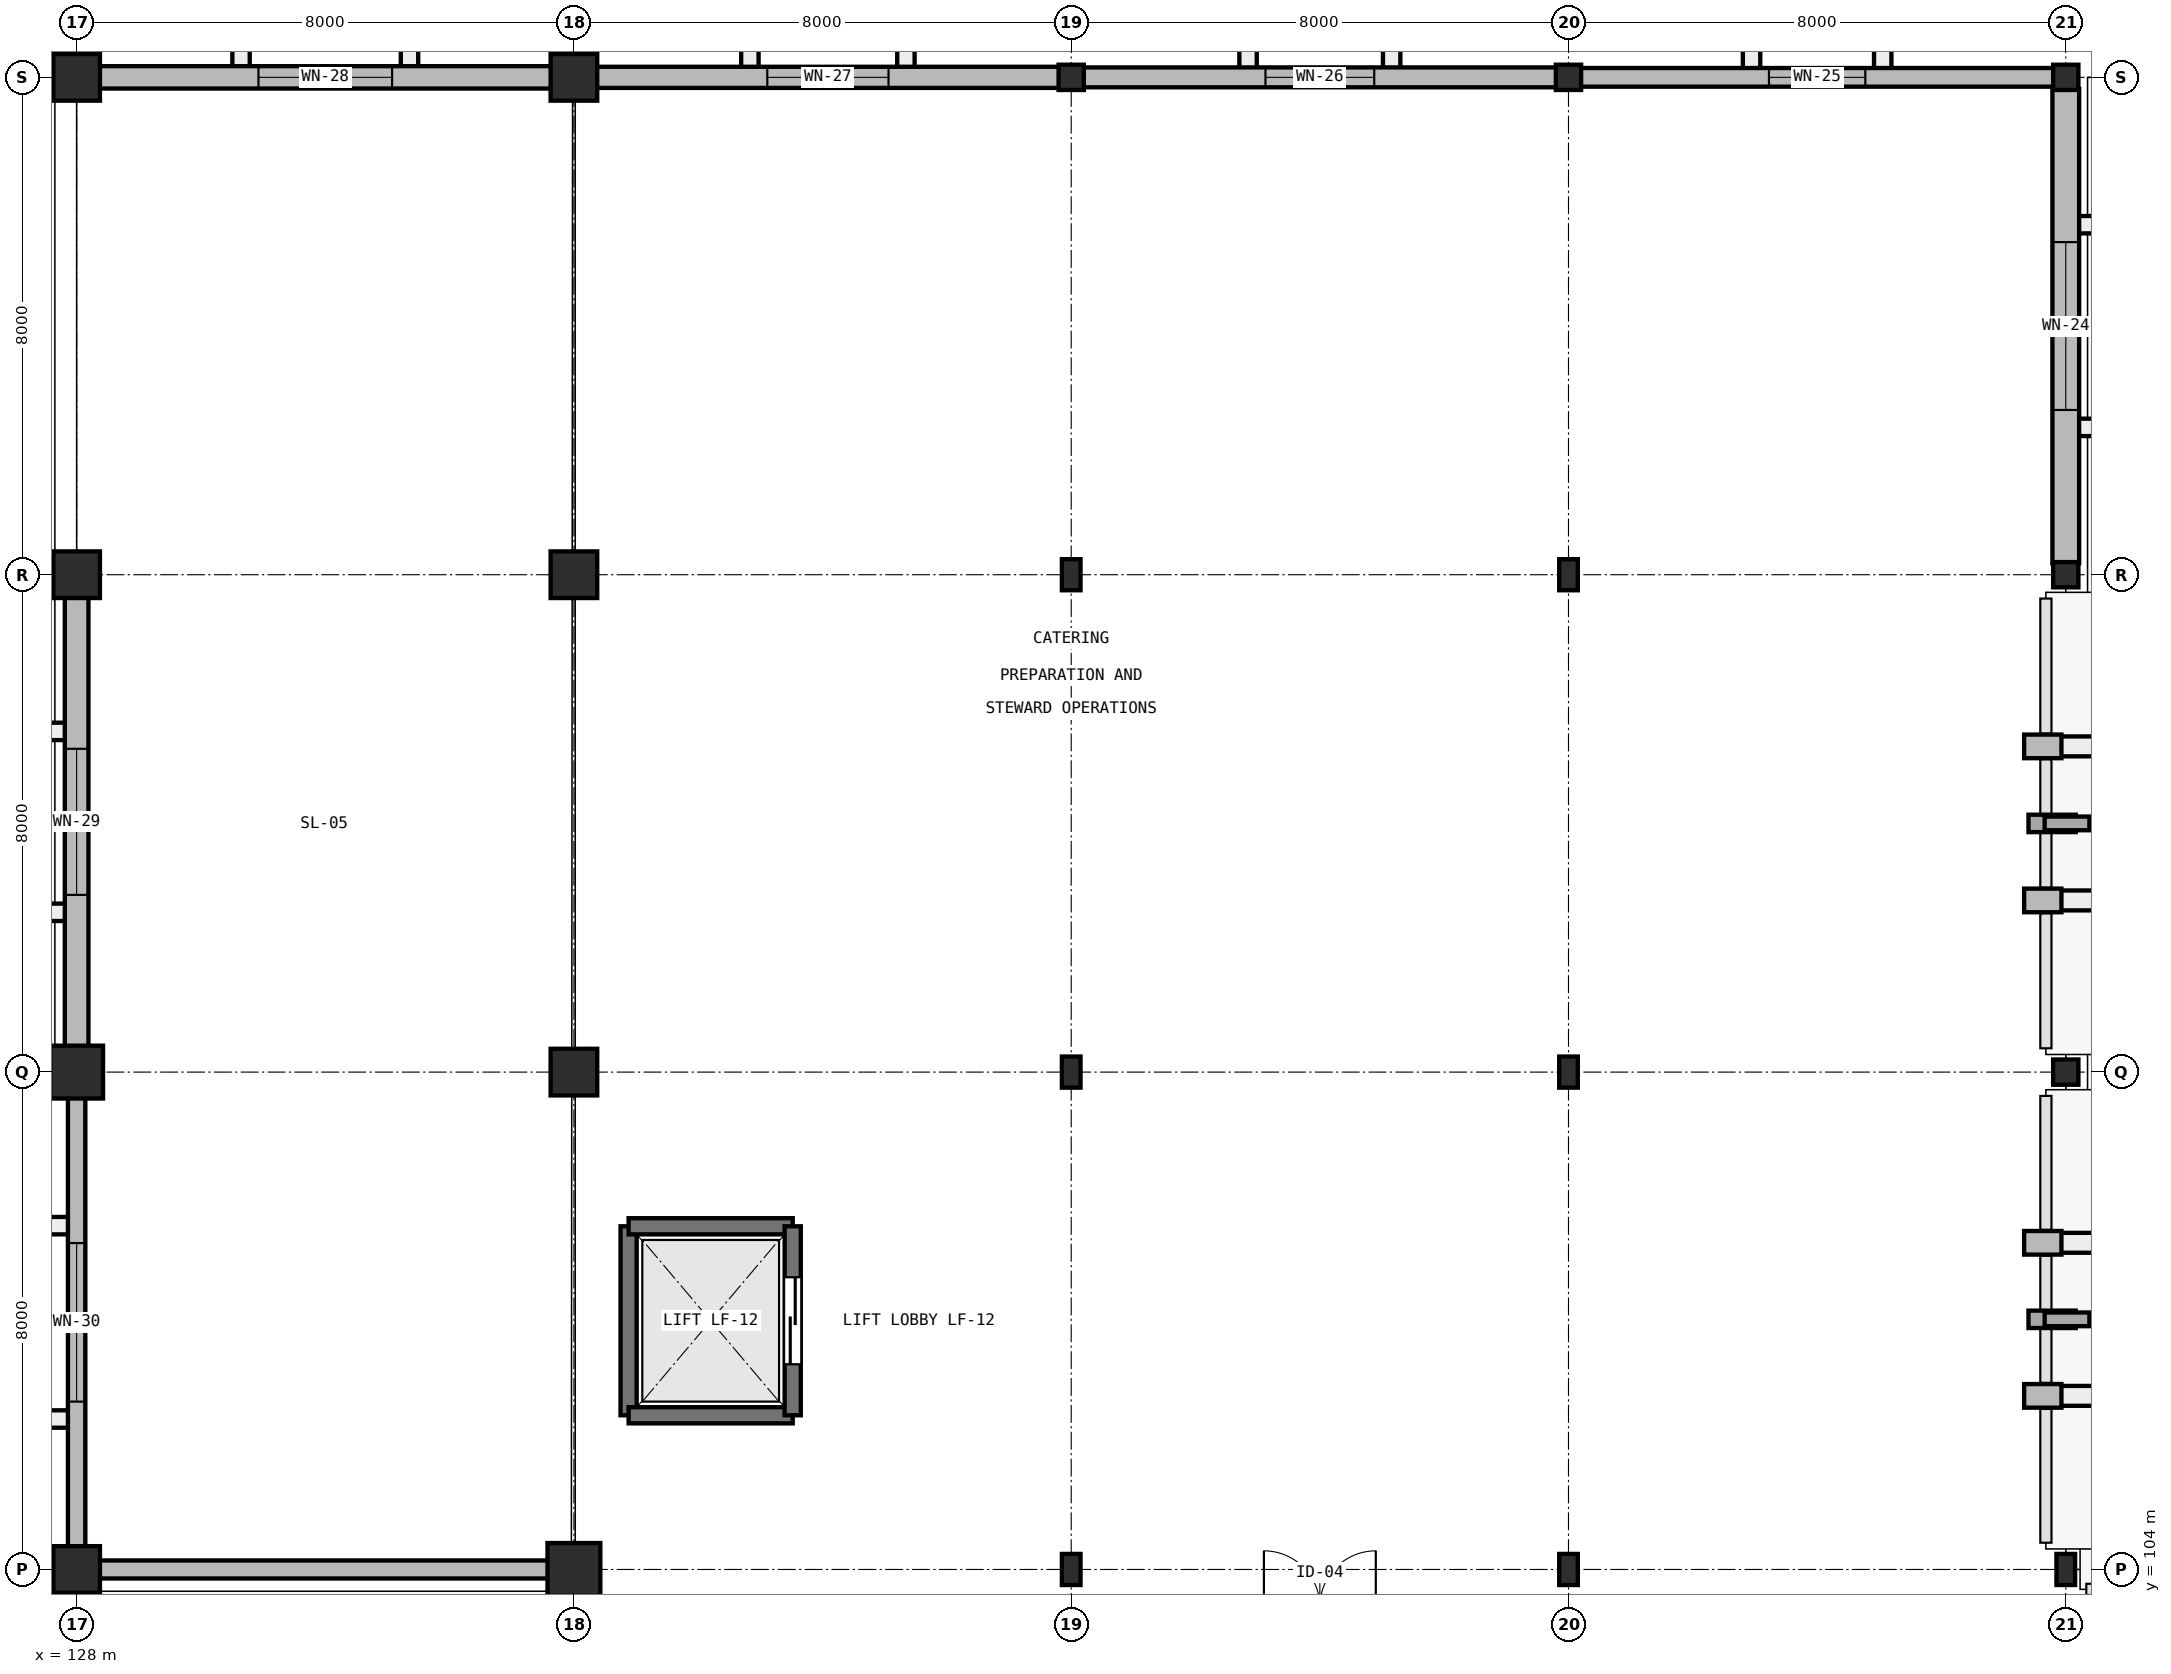
"""IFC4 building model, lengths in metres.
Left out: names, types, materials, properties, quantities, classifications, styles, units other than length and angle.
Written with IfcOpenShell. Run it as: python <this file> out.ifc"""

import sys

from ifc_helpers import new_model, si_unit, direction, frame, frame_2d, origin, origin_2d, place, context, subcontext, project, spatial, rectangle, hollow_circle, i_section, extrude, element, fill, save


model = new_model("IFC4")
c1 = context("Model", 3, precision=1e-05, world=origin(), true_north=direction((0.0, 1.0)))
c2 = subcontext(c1, "Body", "Model", "MODEL_VIEW")
j1 = project(units=[si_unit("LENGTHUNIT", "METRE"), si_unit("PLANEANGLEUNIT", "RADIAN")], contexts=[c1])
p1 = place(None, origin())
s1 = spatial("IfcSite", under=j1, at=p1, CompositionType="ELEMENT")
p2 = place(p1, origin())
s2 = spatial("IfcBuilding", under=s1, at=p2, CompositionType="ELEMENT")
p3 = place(p2, frame((0.0, 0.0, 5.4)))
s3 = spatial("IfcBuildingStorey", under=s2, at=p3, CompositionType="ELEMENT", Elevation=5.4)
p4 = place(p3, frame((128.0, 104.0, 0.0), z_axis=(0.0, 0.0, 1.0), x_axis=(1.0, 0.0, 0.0)))
e1 = element("IfcColumn", 1, at=p4, inside=s3, PredefinedType="COLUMN", context=c2, shape_type="SweptSolid", body=[
    extrude(rectangle(XDim=0.75, YDim=0.75, at=origin_2d()), origin(), (0.0, 0.0, 1.0), 4.8),
])
p5 = place(p3, frame((128.0, 112.0, 0.0), z_axis=(0.0, 0.0, 1.0), x_axis=(1.0, 0.0, 0.0)))
e2 = element("IfcColumn", 2, at=p5, inside=s3, PredefinedType="COLUMN", context=c2, shape_type="SweptSolid", body=[
    extrude(rectangle(XDim=0.85, YDim=0.85, at=origin_2d()), origin(), (0.0, 0.0, 1.0), 4.8),
])
for number, where, z_axis, x_axis in (
    (3, (128.0, 120.0, 0.0), (0.0, 0.0, 1.0), (1.0, 0.0, 0.0)),
    (4, (128.0, 128.0, 0.0), (0.0, 0.0, 1.0), (1.0, 0.0, 0.0)),
):
    element("IfcColumn", number, at=place(p3, frame(where, z_axis=z_axis, x_axis=x_axis)), inside=s3, PredefinedType="COLUMN", context=c2, shape_type="SweptSolid", body=[
        extrude(rectangle(XDim=0.75, YDim=0.75, at=origin_2d()), origin(), (0.0, 0.0, 1.0), 4.8),
    ])
p6 = place(p3, frame((136.0, 104.0, 0.0), z_axis=(0.0, 0.0, 1.0), x_axis=(1.0, 0.0, 0.0)))
e5 = element("IfcColumn", 5, at=p6, inside=s3, PredefinedType="COLUMN", context=c2, shape_type="SweptSolid", body=[
    extrude(rectangle(XDim=0.85, YDim=0.85, at=origin_2d()), origin(), (0.0, 0.0, 1.0), 4.8),
])
for number, where, z_axis, x_axis in (
    (6, (136.0, 112.0, 0.0), (0.0, 0.0, 1.0), (1.0, 0.0, 0.0)),
    (7, (136.0, 120.0, 0.0), (0.0, 0.0, 1.0), (1.0, 0.0, 0.0)),
    (8, (136.0, 128.0, 0.0), (0.0, 0.0, 1.0), (1.0, 0.0, 0.0)),
):
    element("IfcColumn", number, at=place(p3, frame(where, z_axis=z_axis, x_axis=x_axis)), inside=s3, PredefinedType="COLUMN", context=c2, shape_type="SweptSolid", body=[
        extrude(rectangle(XDim=0.75, YDim=0.75, at=origin_2d()), origin(), (0.0, 0.0, 1.0), 4.8),
    ])
for number, where, z_axis, x_axis in (
    (9, (144.0, 104.0, 0.0), (0.0, 0.0, 1.0), (1.0, 0.0, 0.0)),
    (10, (144.0, 112.0, 0.0), (0.0, 0.0, 1.0), (1.0, 0.0, 0.0)),
    (11, (144.0, 120.0, 0.0), (0.0, 0.0, 1.0), (1.0, 0.0, 0.0)),
):
    element("IfcColumn", number, at=place(p3, frame(where, z_axis=z_axis, x_axis=x_axis)), inside=s3, PredefinedType="COLUMN", context=c2, shape_type="SweptSolid", body=[
        extrude(i_section(OverallWidth=0.3, OverallDepth=0.5, WebThickness=0.014, FlangeThickness=0.028, FilletRadius=0.027, at=origin_2d()), origin(), (0.0, 0.0, 1.0), 4.8),
    ])
p7 = place(p3, frame((144.0, 128.0, 0.0), z_axis=(0.0, 0.0, 1.0), x_axis=(1.0, 0.0, 0.0)))
e12 = element("IfcColumn", 12, at=p7, inside=s3, PredefinedType="COLUMN", context=c2, shape_type="SweptSolid", body=[
    extrude(hollow_circle(Radius=0.203, WallThickness=0.02, at=origin_2d()), origin(), (0.0, 0.0, 1.0), 4.8),
])
for number, where, z_axis, x_axis in (
    (13, (152.0, 104.0, 0.0), (0.0, 0.0, 1.0), (1.0, 0.0, 0.0)),
    (14, (152.0, 112.0, 0.0), (0.0, 0.0, 1.0), (1.0, 0.0, 0.0)),
    (15, (152.0, 120.0, 0.0), (0.0, 0.0, 1.0), (1.0, 0.0, 0.0)),
):
    element("IfcColumn", number, at=place(p3, frame(where, z_axis=z_axis, x_axis=x_axis)), inside=s3, PredefinedType="COLUMN", context=c2, shape_type="SweptSolid", body=[
        extrude(i_section(OverallWidth=0.3, OverallDepth=0.5, WebThickness=0.014, FlangeThickness=0.028, FilletRadius=0.027, at=origin_2d()), origin(), (0.0, 0.0, 1.0), 4.8),
    ])
p8 = place(p3, frame((152.0, 128.0, 0.0), z_axis=(0.0, 0.0, 1.0), x_axis=(1.0, 0.0, 0.0)))
e16 = element("IfcColumn", 16, at=p8, inside=s3, PredefinedType="COLUMN", context=c2, shape_type="SweptSolid", body=[
    extrude(hollow_circle(Radius=0.203, WallThickness=0.02, at=origin_2d()), origin(), (0.0, 0.0, 1.0), 4.8),
])
p9 = place(p3, frame((160.0, 104.0, 0.0), z_axis=(0.0, 0.0, 1.0), x_axis=(1.0, 0.0, 0.0)))
e17 = element("IfcColumn", 17, at=p9, inside=s3, PredefinedType="COLUMN", context=c2, shape_type="SweptSolid", body=[
    extrude(i_section(OverallWidth=0.3, OverallDepth=0.5, WebThickness=0.014, FlangeThickness=0.028, FilletRadius=0.027, at=origin_2d()), origin(), (0.0, 0.0, 1.0), 4.8),
])
for number, where, z_axis, x_axis in (
    (18, (160.0, 112.0, 0.0), (0.0, 0.0, 1.0), (1.0, 0.0, 0.0)),
    (19, (160.0, 120.0, 0.0), (0.0, 0.0, 1.0), (1.0, 0.0, 0.0)),
    (20, (160.0, 128.0, 0.0), (0.0, 0.0, 1.0), (1.0, 0.0, 0.0)),
):
    element("IfcColumn", number, at=place(p3, frame(where, z_axis=z_axis, x_axis=x_axis)), inside=s3, PredefinedType="COLUMN", context=c2, shape_type="SweptSolid", body=[
        extrude(hollow_circle(Radius=0.203, WallThickness=0.02, at=origin_2d()), origin(), (0.0, 0.0, 1.0), 4.8),
    ])
for number, where, z_axis, x_axis in (
    (21, (159.33, 109.254, 0.0), (0.0, 0.0, 1.0), (1.0, 0.0, 0.0)),
    (22, (159.33, 106.792, 0.0), (0.0, 0.0, 1.0), (1.0, 0.0, 0.0)),
):
    element("IfcWall", number, at=place(p3, frame(where, z_axis=z_axis, x_axis=x_axis)), inside=s3, PredefinedType="SOLIDWALL", context=c2, shape_type="SweptSolid", body=[
        extrude(rectangle(XDim=0.6, YDim=0.38, at=frame_2d((0.3, 0.0))), origin(), (0.0, 0.0, 1.0), 3.9),
    ])
for number, where, z_axis, x_axis in (
    (23, (159.33, 117.239, 0.0), (0.0, 0.0, 1.0), (1.0, 0.0, 0.0)),
    (24, (159.33, 114.761, 0.0), (0.0, 0.0, 1.0), (1.0, 0.0, 0.0)),
):
    element("IfcWall", number, at=place(p3, frame(where, z_axis=z_axis, x_axis=x_axis)), inside=s3, PredefinedType="SOLIDWALL", context=c2, shape_type="SweptSolid", body=[
        extrude(rectangle(XDim=0.6, YDim=0.38, at=frame_2d((0.3, 0.0))), origin(), (0.0, 0.0, 1.0), 3.91),
    ])
p10 = place(p3, frame((160.0, 127.817, 0.0), z_axis=(0.0, 0.0, 1.0), x_axis=(0.0, -1.0, 0.0)))
e25 = element("IfcWall", 25, at=p10, inside=s3, PredefinedType="SOLIDWALL", context=c2, shape_type="SweptSolid", body=[
    extrude(rectangle(XDim=7.634, YDim=0.43, at=frame_2d((3.817, 0.0))), origin(), (0.0, 0.0, 1.0), 3.91),
])
p11 = place(p10, frame((2.467, 0.0, 0.95)))
e26 = element("IfcOpeningElement", 26, at=p11, cuts=e25, PredefinedType="OPENING", context=c2, shape_type="SweptSolid", body=[
    extrude(rectangle(XDim=2.7, YDim=1.7, at=frame_2d((1.35, 0.85))), frame((0.0, 0.225, 0.0), z_axis=(0.0, -1.0, 0.0), x_axis=(1.0, 0.0, 0.0)), (0.0, 0.0, 1.0), 0.45),
])
p12 = place(p3, frame((152.183, 128.0, 0.0), z_axis=(0.0, 0.0, 1.0), x_axis=(1.0, 0.0, 0.0)))
e27 = element("IfcWall", 27, at=p12, inside=s3, PredefinedType="SOLIDWALL", context=c2, shape_type="SweptSolid", body=[
    extrude(rectangle(XDim=7.634, YDim=0.3, at=frame_2d((3.817, 0.0))), origin(), (0.0, 0.0, 1.0), 3.91),
])
p13 = place(p12, frame((3.042, 0.0, 0.95)))
e28 = element("IfcOpeningElement", 28, at=p13, cuts=e27, PredefinedType="OPENING", context=c2, shape_type="SweptSolid", body=[
    extrude(rectangle(XDim=1.55, YDim=1.65, at=frame_2d((0.775, 0.825))), frame((0.0, 0.16, 0.0), z_axis=(0.0, -1.0, 0.0), x_axis=(1.0, 0.0, 0.0)), (0.0, 0.0, 1.0), 0.32),
])
p14 = place(p3, frame((144.183, 128.0, 0.0), z_axis=(0.0, 0.0, 1.0), x_axis=(1.0, 0.0, 0.0)))
e29 = element("IfcWall", 29, at=p14, inside=s3, PredefinedType="SOLIDWALL", context=c2, shape_type="SweptSolid", body=[
    extrude(rectangle(XDim=7.634, YDim=0.32, at=frame_2d((3.817, 0.0))), origin(), (0.0, 0.0, 1.0), 3.91),
])
p15 = place(p14, frame((2.942, 0.0, 0.95)))
e30 = element("IfcOpeningElement", 30, at=p15, cuts=e29, PredefinedType="OPENING", context=c2, shape_type="SweptSolid", body=[
    extrude(rectangle(XDim=1.75, YDim=1.65, at=frame_2d((0.875, 0.825))), frame((0.0, 0.17, 0.0), z_axis=(0.0, -1.0, 0.0), x_axis=(1.0, 0.0, 0.0)), (0.0, 0.0, 1.0), 0.34),
])
p16 = place(p3, frame((136.355, 128.0, 0.0), z_axis=(0.0, 0.0, 1.0), x_axis=(1.0, 0.0, 0.0)))
e31 = element("IfcWall", 31, at=p16, inside=s3, PredefinedType="SOLIDWALL", context=c2, shape_type="SweptSolid", body=[
    extrude(rectangle(XDim=7.462, YDim=0.34, at=frame_2d((3.731, 0.0))), origin(), (0.0, 0.0, 1.0), 3.91),
])
p17 = place(p16, frame((2.756, 0.0, 0.95)))
e32 = element("IfcOpeningElement", 32, at=p17, cuts=e31, PredefinedType="OPENING", context=c2, shape_type="SweptSolid", body=[
    extrude(rectangle(XDim=1.95, YDim=1.65, at=frame_2d((0.975, 0.825))), frame((0.0, 0.18, 0.0), z_axis=(0.0, -1.0, 0.0), x_axis=(1.0, 0.0, 0.0)), (0.0, 0.0, 1.0), 0.36),
])
p18 = place(p3, frame((128.355, 128.0, 0.0), z_axis=(0.0, 0.0, 1.0), x_axis=(1.0, 0.0, 0.0)))
e33 = element("IfcWall", 33, at=p18, inside=s3, PredefinedType="SOLIDWALL", context=c2, shape_type="SweptSolid", body=[
    extrude(rectangle(XDim=7.29, YDim=0.36, at=frame_2d((3.645, 0.0))), origin(), (0.0, 0.0, 1.0), 3.91),
])
p19 = place(p18, frame((2.57, 0.0, 0.95)))
e34 = element("IfcOpeningElement", 34, at=p19, cuts=e33, PredefinedType="OPENING", context=c2, shape_type="SweptSolid", body=[
    extrude(rectangle(XDim=2.15, YDim=1.65, at=frame_2d((1.075, 0.825))), frame((0.0, 0.19, 0.0), z_axis=(0.0, -1.0, 0.0), x_axis=(1.0, 0.0, 0.0)), (0.0, 0.0, 1.0), 0.38),
])
p20 = place(p3, frame((128.0, 112.405, 0.0), z_axis=(0.0, 0.0, 1.0), x_axis=(0.0, 1.0, 0.0)))
e35 = element("IfcWall", 35, at=p20, inside=s3, PredefinedType="SOLIDWALL", context=c2, shape_type="SweptSolid", body=[
    extrude(rectangle(XDim=7.24, YDim=0.38, at=frame_2d((3.62, 0.0))), origin(), (0.0, 0.0, 1.0), 3.9),
])
p21 = place(p20, frame((2.445, 0.0, 0.95)))
e36 = element("IfcOpeningElement", 36, at=p21, cuts=e35, PredefinedType="OPENING", context=c2, shape_type="SweptSolid", body=[
    extrude(rectangle(XDim=2.35, YDim=1.65, at=frame_2d((1.175, 0.825))), frame((0.0, 0.2, 0.0), z_axis=(0.0, -1.0, 0.0), x_axis=(1.0, 0.0, 0.0)), (0.0, 0.0, 1.0), 0.4),
])
p22 = place(p3, frame((128.0, 104.355, 0.0), z_axis=(0.0, 0.0, 1.0), x_axis=(0.0, 1.0, 0.0)))
e37 = element("IfcWall", 37, at=p22, inside=s3, PredefinedType="SOLIDWALL", context=c2, shape_type="SweptSolid", body=[
    extrude(rectangle(XDim=7.24, YDim=0.28, at=frame_2d((3.62, 0.0))), origin(), (0.0, 0.0, 1.0), 3.91),
])
p23 = place(p22, frame((2.345, 0.0, 0.95)))
e38 = element("IfcOpeningElement", 38, at=p23, cuts=e37, PredefinedType="OPENING", context=c2, shape_type="SweptSolid", body=[
    extrude(rectangle(XDim=2.55, YDim=1.65, at=frame_2d((1.275, 0.825))), frame((0.0, 0.15, 0.0), z_axis=(0.0, -1.0, 0.0), x_axis=(1.0, 0.0, 0.0)), (0.0, 0.0, 1.0), 0.3),
])
p24 = place(p3, frame((135.595, 104.0, 0.0), z_axis=(0.0, 0.0, 1.0), x_axis=(-1.0, 0.0, 0.0)))
e39 = element("IfcWall", 39, at=p24, inside=s3, PredefinedType="SOLIDWALL", context=c2, shape_type="SweptSolid", body=[
    extrude(rectangle(XDim=7.24, YDim=0.29, at=frame_2d((3.62, 0.0))), origin(), (0.0, 0.0, 1.0), 3.91),
])
p25 = place(p3, frame((136.88, 106.48, 0.0), z_axis=(0.0, 0.0, 1.0), x_axis=(0.0, 1.0, 0.0)))
e40 = element("IfcWall", 40, at=p25, inside=s3, PredefinedType="SHEAR", context=c2, shape_type="SweptSolid", body=[
    extrude(rectangle(XDim=3.04, YDim=0.26, at=frame_2d((1.52, 0.0))), origin(), (0.0, 0.0, 1.0), 4.48),
])
for number, where, z_axis, x_axis in (
    (41, (136.88, 109.52, 0.0), (0.0, 0.0, 1.0), (1.0, 0.0, 0.0)),
    (42, (139.52, 106.48, 0.0), (0.0, 0.0, 1.0), (-1.0, 0.0, 0.0)),
):
    element("IfcWall", number, at=place(p3, frame(where, z_axis=z_axis, x_axis=x_axis)), inside=s3, PredefinedType="SHEAR", context=c2, shape_type="SweptSolid", body=[
        extrude(rectangle(XDim=2.64, YDim=0.26, at=frame_2d((1.32, 0.0))), origin(), (0.0, 0.0, 1.0), 4.48),
    ])
p26 = place(p3, frame((139.52, 109.52, 0.0), z_axis=(0.0, 0.0, 1.0), x_axis=(0.0, -1.0, 0.0)))
e43 = element("IfcWall", 43, at=p26, inside=s3, PredefinedType="SHEAR", context=c2, shape_type="SweptSolid", body=[
    extrude(rectangle(XDim=3.04, YDim=0.26, at=frame_2d((1.52, 0.0))), origin(), (0.0, 0.0, 1.0), 4.48),
])
p27 = place(p26, frame((0.82, 0.0, 0.0)))
e44 = element("IfcOpeningElement", 44, at=p27, cuts=e43, PredefinedType="OPENING", context=c2, shape_type="SweptSolid", body=[
    extrude(rectangle(XDim=1.4, YDim=2.2, at=frame_2d((0.7, 1.1))), frame((0.0, 0.14, 0.0), z_axis=(0.0, -1.0, 0.0), x_axis=(1.0, 0.0, 0.0)), (0.0, 0.0, 1.0), 0.28),
])
p28 = place(p11, origin())
e45 = element("IfcWindow", 45, at=p28, inside=s3, PartitioningType="SINGLE_PANEL", PredefinedType="WINDOW", context=c2, shape_type="SweptSolid", body=[
    extrude(rectangle(XDim=2.7, YDim=1.7, at=frame_2d((1.35, 0.85))), frame((0.0, 0.03, 0.0), z_axis=(0.0, -1.0, 0.0), x_axis=(1.0, 0.0, 0.0)), (0.0, 0.0, 1.0), 0.06),
])
fill(e26, e45)
p29 = place(p13, origin())
e46 = element("IfcWindow", 46, at=p29, inside=s3, PartitioningType="SINGLE_PANEL", PredefinedType="WINDOW", context=c2, shape_type="SweptSolid", body=[
    extrude(rectangle(XDim=1.55, YDim=1.65, at=frame_2d((0.775, 0.825))), frame((0.0, 0.03, 0.0), z_axis=(0.0, -1.0, 0.0), x_axis=(1.0, 0.0, 0.0)), (0.0, 0.0, 1.0), 0.06),
])
fill(e28, e46)
p30 = place(p15, origin())
e47 = element("IfcWindow", 47, at=p30, inside=s3, PartitioningType="SINGLE_PANEL", PredefinedType="WINDOW", context=c2, shape_type="SweptSolid", body=[
    extrude(rectangle(XDim=1.75, YDim=1.65, at=frame_2d((0.875, 0.825))), frame((0.0, 0.03, 0.0), z_axis=(0.0, -1.0, 0.0), x_axis=(1.0, 0.0, 0.0)), (0.0, 0.0, 1.0), 0.06),
])
fill(e30, e47)
p31 = place(p17, origin())
e48 = element("IfcWindow", 48, at=p31, inside=s3, PartitioningType="SINGLE_PANEL", PredefinedType="WINDOW", context=c2, shape_type="SweptSolid", body=[
    extrude(rectangle(XDim=1.95, YDim=1.65, at=frame_2d((0.975, 0.825))), frame((0.0, 0.03, 0.0), z_axis=(0.0, -1.0, 0.0), x_axis=(1.0, 0.0, 0.0)), (0.0, 0.0, 1.0), 0.06),
])
fill(e32, e48)
p32 = place(p19, origin())
e49 = element("IfcWindow", 49, at=p32, inside=s3, PartitioningType="SINGLE_PANEL", PredefinedType="WINDOW", context=c2, shape_type="SweptSolid", body=[
    extrude(rectangle(XDim=2.15, YDim=1.65, at=frame_2d((1.075, 0.825))), frame((0.0, 0.03, 0.0), z_axis=(0.0, -1.0, 0.0), x_axis=(1.0, 0.0, 0.0)), (0.0, 0.0, 1.0), 0.06),
])
fill(e34, e49)
p33 = place(p21, origin())
e50 = element("IfcWindow", 50, at=p33, inside=s3, PartitioningType="SINGLE_PANEL", PredefinedType="WINDOW", context=c2, shape_type="SweptSolid", body=[
    extrude(rectangle(XDim=2.35, YDim=1.65, at=frame_2d((1.175, 0.825))), frame((0.0, 0.03, 0.0), z_axis=(0.0, -1.0, 0.0), x_axis=(1.0, 0.0, 0.0)), (0.0, 0.0, 1.0), 0.06),
])
fill(e36, e50)
p34 = place(p23, origin())
e51 = element("IfcWindow", 51, at=p34, inside=s3, PartitioningType="SINGLE_PANEL", PredefinedType="WINDOW", context=c2, shape_type="SweptSolid", body=[
    extrude(rectangle(XDim=2.55, YDim=1.65, at=frame_2d((1.275, 0.825))), frame((0.0, 0.03, 0.0), z_axis=(0.0, -1.0, 0.0), x_axis=(1.0, 0.0, 0.0)), (0.0, 0.0, 1.0), 0.06),
])
fill(e38, e51)
p35 = place(p27, origin())
e52 = element("IfcDoor", 52, at=p35, inside=s3, OperationType="SLIDING_TO_LEFT", PredefinedType="DOOR", context=c2, shape_type="SweptSolid", body=[
    extrude(rectangle(XDim=1.4, YDim=2.2, at=frame_2d((0.7, 1.1))), frame((0.0, 0.025, 0.0), z_axis=(0.0, -1.0, 0.0), x_axis=(1.0, 0.0, 0.0)), (0.0, 0.0, 1.0), 0.05),
])
fill(e44, e52)
save(model, sys.argv[1])
